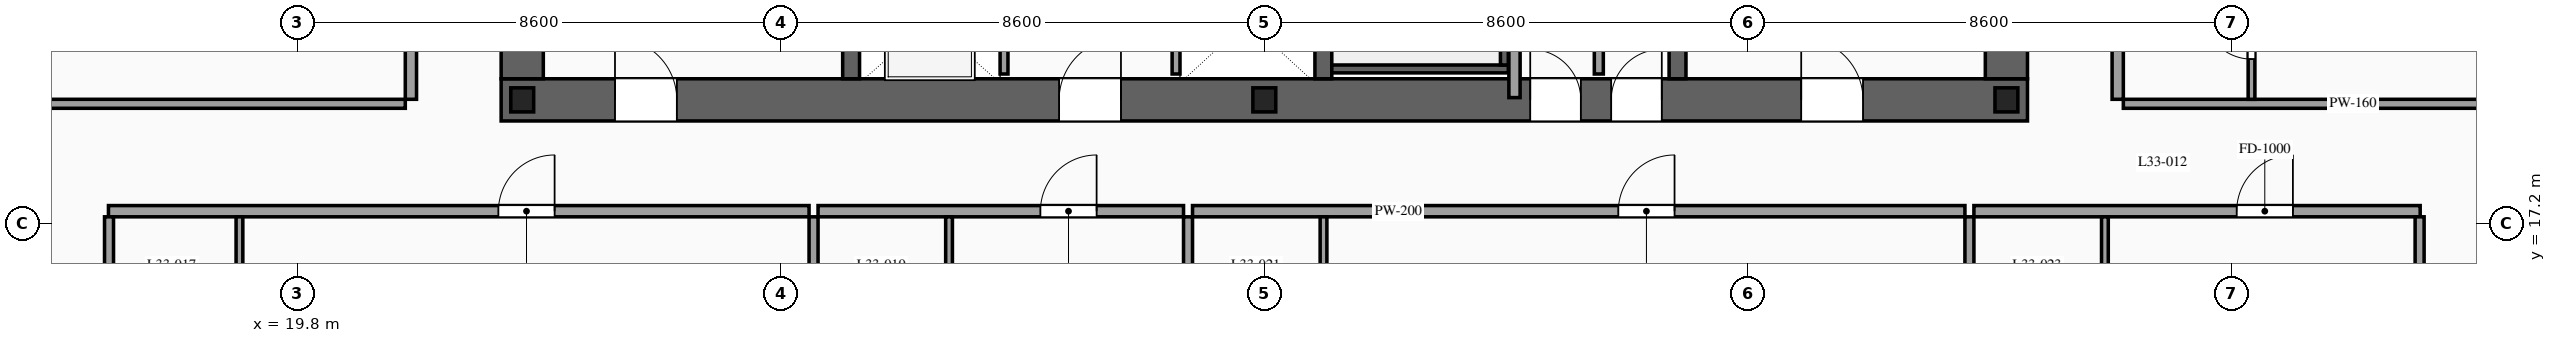
"""IFC4 building model, lengths in metres.
Left out: names, types, materials, properties, quantities, classifications, styles, units other than length and angle.
Written with IfcOpenShell. Run it as: python <this file> out.ifc"""

import sys

from ifc_helpers import new_model, si_unit, direction, frame, frame_2d, origin, origin_2d, place, context, subcontext, project, spatial, rectangle, i_section, extrude, source, transform, mapped, element, fill, save


model = new_model("IFC4")
c1 = context("Model", 3, precision=1e-05, world=origin(), true_north=direction((0.0, 1.0)))
c2 = subcontext(c1, "Body", "Model", "MODEL_VIEW")
j1 = project(units=[si_unit("LENGTHUNIT", "METRE"), si_unit("PLANEANGLEUNIT", "RADIAN")], contexts=[c1])
p1 = place(None, origin())
s1 = spatial("IfcSite", under=j1, at=p1, CompositionType="ELEMENT")
p2 = place(p1, origin())
s2 = spatial("IfcBuilding", under=s1, at=p2, CompositionType="ELEMENT")
p3 = place(p2, frame((0.0, 0.0, 126.2)))
s3 = spatial("IfcBuildingStorey", under=s2, at=p3, CompositionType="ELEMENT", Elevation=126.2)
p4 = place(p3, frame((23.425, 19.4, 0.0), z_axis=(0.0, 0.0, 1.0), x_axis=(1.0, 0.0, 0.0)))
e1 = element("IfcWall", 1, at=p4, inside=s3, PredefinedType="SHEAR", context=c2, shape_type="SweptSolid", body=[
    extrude(rectangle(XDim=27.15, YDim=0.75, at=frame_2d((13.575, 0.0))), origin(), (0.0, 0.0, 1.0), 3.6),
])
p5 = place(p4, frame((2.025, 0.0, 0.0)))
e2 = element("IfcOpeningElement", 2, at=p5, cuts=e1, PredefinedType="OPENING", context=c2, shape_type="SweptSolid", body=[
    extrude(rectangle(XDim=1.1, YDim=2.2, at=frame_2d((0.55, 1.1))), frame((0.0, 0.39, 0.0), z_axis=(0.0, -1.0, 0.0), x_axis=(1.0, 0.0, 0.0)), (0.0, 0.0, 1.0), 0.78),
])
p6 = place(p4, frame((9.925, 0.0, 0.0)))
e3 = element("IfcOpeningElement", 3, at=p6, cuts=e1, PredefinedType="OPENING", context=c2, shape_type="SweptSolid", body=[
    extrude(rectangle(XDim=1.1, YDim=2.2, at=frame_2d((0.55, 1.1))), frame((0.0, 0.39, 0.0), z_axis=(0.0, -1.0, 0.0), x_axis=(1.0, 0.0, 0.0)), (0.0, 0.0, 1.0), 0.78),
])
p7 = place(p4, frame((23.125, 0.0, 0.0)))
e4 = element("IfcOpeningElement", 4, at=p7, cuts=e1, PredefinedType="OPENING", context=c2, shape_type="SweptSolid", body=[
    extrude(rectangle(XDim=1.1, YDim=2.2, at=frame_2d((0.55, 1.1))), frame((0.0, 0.39, 0.0), z_axis=(0.0, -1.0, 0.0), x_axis=(1.0, 0.0, 0.0)), (0.0, 0.0, 1.0), 0.78),
])
p8 = place(p4, frame((19.745, 0.0, 0.0)))
e5 = element("IfcOpeningElement", 5, at=p8, cuts=e1, PredefinedType="OPENING", context=c2, shape_type="SweptSolid", body=[
    extrude(rectangle(XDim=0.9, YDim=2.15, at=frame_2d((0.45, 1.075))), frame((0.0, 0.39, 0.0), z_axis=(0.0, -1.0, 0.0), x_axis=(1.0, 0.0, 0.0)), (0.0, 0.0, 1.0), 0.78),
])
p9 = place(p4, frame((18.305, 0.0, 0.0)))
e6 = element("IfcOpeningElement", 6, at=p9, cuts=e1, PredefinedType="OPENING", context=c2, shape_type="SweptSolid", body=[
    extrude(rectangle(XDim=0.9, YDim=2.15, at=frame_2d((0.45, 1.075))), frame((0.0, 0.39, 0.0), z_axis=(0.0, -1.0, 0.0), x_axis=(1.0, 0.0, 0.0)), (0.0, 0.0, 1.0), 0.78),
])
m1 = source(origin(), c2, "Body", "SweptSolid", [
    extrude(rectangle(XDim=12.05, YDim=0.75, at=frame_2d((6.025, 0.0))), origin(), (0.0, 0.0, 1.0), 3.6),
])
for number, where, z_axis, x_axis in (
    (7, (23.8, 19.775, 0.0), (0.0, 0.0, 1.0), (0.0, 1.0, 0.0)),
    (8, (50.2, 19.775, 0.0), (0.0, 0.0, 1.0), (0.0, 1.0, 0.0)),
):
    element("IfcWall", number, at=place(p3, frame(where, z_axis=z_axis, x_axis=x_axis)), inside=s3, PredefinedType="SHEAR", context=c2, shape_type="MappedRepresentation", body=[
        mapped(m1, transform((0.0, 0.0, 0.0), scale=1.0)),
    ])
m2 = source(origin(), c2, "Body", "SweptSolid", [
    extrude(rectangle(XDim=12.05, YDim=0.3, at=frame_2d((6.025, 0.0))), origin(), (0.0, 0.0, 1.0), 3.6),
])
for number, where, z_axis, x_axis in (
    (9, (29.65, 19.775, 0.0), (0.0, 0.0, 1.0), (0.0, 1.0, 0.0)),
    (10, (38.05, 19.775, 0.0), (0.0, 0.0, 1.0), (0.0, 1.0, 0.0)),
    (11, (44.35, 19.775, 0.0), (0.0, 0.0, 1.0), (0.0, 1.0, 0.0)),
):
    element("IfcWall", number, at=place(p3, frame(where, z_axis=z_axis, x_axis=x_axis)), inside=s3, PredefinedType="SOLIDWALL", context=c2, shape_type="MappedRepresentation", body=[
        mapped(m2, transform((0.0, 0.0, 0.0), scale=1.0)),
    ])
m3 = source(origin(), c2, "Body", "SweptSolid", [
    extrude(i_section(OverallWidth=0.407, OverallDepth=0.428, WebThickness=0.02, FlangeThickness=0.035, at=origin_2d()), origin(), (0.0, 0.0, 1.0), 3.6),
])
for number, where, z_axis, x_axis in (
    (12, (23.8, 19.4, 0.0), (0.0, 0.0, 1.0), (1.0, 0.0, 0.0)),
    (13, (37.0, 19.4, 0.0), (0.0, 0.0, 1.0), (1.0, 0.0, 0.0)),
    (14, (50.2, 19.4, 0.0), (0.0, 0.0, 1.0), (1.0, 0.0, 0.0)),
):
    element("IfcColumn", number, at=place(p3, frame(where, z_axis=z_axis, x_axis=x_axis)), inside=s3, PredefinedType="COLUMN", context=c2, shape_type="MappedRepresentation", body=[
        mapped(m3, transform((0.0, 0.0, 0.0), scale=1.0)),
    ])
p10 = place(p3, frame((32.37, 19.86, 0.0), z_axis=(0.0, 0.0, 1.0), x_axis=(0.0, 1.0, 0.0)))
e15 = element("IfcWall", 15, at=p10, inside=s3, PredefinedType="SOLIDWALL", context=c2, shape_type="SweptSolid", body=[
    extrude(rectangle(XDim=2.04, YDim=0.14, at=frame_2d((1.02, 0.0))), origin(), (0.0, 0.0, 1.0), 3.32),
])
p11 = place(p10, frame((0.47, 0.0, 0.0)))
e16 = element("IfcOpeningElement", 16, at=p11, cuts=e15, PredefinedType="OPENING", context=c2, shape_type="SweptSolid", body=[
    extrude(rectangle(XDim=1.1, YDim=2.2, at=frame_2d((0.55, 1.1))), frame((0.0, 0.085, 0.0), z_axis=(0.0, -1.0, 0.0), x_axis=(1.0, 0.0, 0.0)), (0.0, 0.0, 1.0), 0.17),
])
m4 = source(origin(), c2, "Body", "SweptSolid", [
    extrude(rectangle(XDim=2.04, YDim=0.14, at=frame_2d((1.02, 0.0))), origin(), (0.0, 0.0, 1.0), 3.32),
])
p12 = place(p3, frame((35.43, 19.86, 0.0), z_axis=(0.0, 0.0, 1.0), x_axis=(0.0, 1.0, 0.0)))
e17 = element("IfcWall", 17, at=p12, inside=s3, PredefinedType="SOLIDWALL", context=c2, shape_type="MappedRepresentation", body=[
    mapped(m4, transform((0.0, 0.0, 0.0), scale=1.0)),
])
m5 = source(origin(), c2, "Body", "SweptSolid", [
    extrude(rectangle(XDim=3.14, YDim=0.14, at=frame_2d((1.57, 0.0))), origin(), (0.0, 0.0, 1.0), 3.32),
])
p13 = place(p3, frame((38.2, 19.95, 0.0), z_axis=(0.0, 0.0, 1.0), x_axis=(1.0, 0.0, 0.0)))
e18 = element("IfcWall", 18, at=p13, inside=s3, PredefinedType="SOLIDWALL", context=c2, shape_type="MappedRepresentation", body=[
    mapped(m5, transform((0.0, 0.0, 0.0), scale=1.0)),
])
m6 = source(origin(), c2, "Body", "SweptSolid", [
    extrude(rectangle(XDim=8.94, YDim=0.14, at=frame_2d((4.47, 0.0))), origin(), (0.0, 0.0, 1.0), 3.32),
])
p14 = place(p3, frame((41.27, 20.02, 0.0), z_axis=(0.0, 0.0, 1.0), x_axis=(0.0, 1.0, 0.0)))
e19 = element("IfcWall", 19, at=p14, inside=s3, PredefinedType="SOLIDWALL", context=c2, shape_type="MappedRepresentation", body=[
    mapped(m6, transform((0.0, 0.0, 0.0), scale=1.0)),
])
m7 = source(origin(), c2, "Body", "SweptSolid", [
    extrude(rectangle(XDim=1.34, YDim=0.16, at=frame_2d((0.67, 0.0))), origin(), (0.0, 0.0, 1.0), 3.32),
])
p15 = place(p3, frame((42.95, 19.86, 0.0), z_axis=(0.0, 0.0, 1.0), x_axis=(0.0, 1.0, 0.0)))
e20 = element("IfcWall", 20, at=p15, inside=s3, PredefinedType="PARTITIONING", context=c2, shape_type="MappedRepresentation", body=[
    mapped(m7, transform((0.0, 0.0, 0.0), scale=1.0)),
])
m8 = source(origin(), c2, "Body", "SweptSolid", [
    extrude(rectangle(XDim=12.72, YDim=0.2, at=frame_2d((6.36, 0.0))), origin(), (0.0, 0.0, 1.0), 3.32),
])
p16 = place(p3, frame((41.45, 19.44, 0.0), z_axis=(0.0, 0.0, 1.0), x_axis=(0.0, 1.0, 0.0)))
e21 = element("IfcWall", 21, at=p16, inside=s3, PredefinedType="PARTITIONING", context=c2, shape_type="MappedRepresentation", body=[
    mapped(m8, transform((0.0, 0.0, 0.0), scale=1.0)),
])
p17 = place(p3, frame((16.44, 17.42, 0.0), z_axis=(0.0, 0.0, 1.0), x_axis=(1.0, 0.0, 0.0)))
e22 = element("IfcWall", 22, at=p17, inside=s3, PredefinedType="PARTITIONING", context=c2, shape_type="SweptSolid", body=[
    extrude(rectangle(XDim=12.462, YDim=0.2, at=frame_2d((6.231, 0.0))), origin(), (0.0, 0.0, 1.0), 3.32),
])
p18 = place(p17, frame((6.936, 0.0, 0.0)))
e23 = element("IfcOpeningElement", 23, at=p18, cuts=e22, PredefinedType="OPENING", context=c2, shape_type="SweptSolid", body=[
    extrude(rectangle(XDim=1.0, YDim=2.2, at=frame_2d((0.5, 1.1))), frame((0.0, 0.115, 0.0), z_axis=(0.0, -1.0, 0.0), x_axis=(1.0, 0.0, 0.0)), (0.0, 0.0, 1.0), 0.23),
])
m9 = source(origin(), c2, "Body", "SweptSolid", [
    extrude(rectangle(XDim=14.97, YDim=0.16, at=frame_2d((7.485, 0.0))), origin(), (0.0, 0.0, 1.0), 3.32),
])
p19 = place(p3, frame((28.982, 2.35, 0.0), z_axis=(0.0, 0.0, 1.0), x_axis=(0.0, 1.0, 0.0)))
e24 = element("IfcWall", 24, at=p19, inside=s3, PredefinedType="PARTITIONING", context=c2, shape_type="MappedRepresentation", body=[
    mapped(m9, transform((0.0, 0.0, 0.0), scale=1.0)),
])
m10 = source(origin(), c2, "Body", "SweptSolid", [
    extrude(rectangle(XDim=2.42, YDim=0.12, at=frame_2d((1.21, 0.0))), origin(), (0.0, 0.0, 1.0), 3.32),
])
p20 = place(p3, frame((18.77, 14.9, 0.0), z_axis=(0.0, 0.0, 1.0), x_axis=(0.0, 1.0, 0.0)))
e25 = element("IfcWall", 25, at=p20, inside=s3, PredefinedType="PARTITIONING", context=c2, shape_type="MappedRepresentation", body=[
    mapped(m10, transform((0.0, 0.0, 0.0), scale=1.0)),
])
p21 = place(p3, frame((29.062, 17.42, 0.0), z_axis=(0.0, 0.0, 1.0), x_axis=(1.0, 0.0, 0.0)))
e26 = element("IfcWall", 26, at=p21, inside=s3, PredefinedType="PARTITIONING", context=c2, shape_type="SweptSolid", body=[
    extrude(rectangle(XDim=6.501, YDim=0.2, at=frame_2d((3.25, 0.0))), origin(), (0.0, 0.0, 1.0), 3.32),
])
p22 = place(p21, frame((3.955, 0.0, 0.0)))
e27 = element("IfcOpeningElement", 27, at=p22, cuts=e26, PredefinedType="OPENING", context=c2, shape_type="SweptSolid", body=[
    extrude(rectangle(XDim=1.0, YDim=2.2, at=frame_2d((0.5, 1.1))), frame((0.0, 0.115, 0.0), z_axis=(0.0, -1.0, 0.0), x_axis=(1.0, 0.0, 0.0)), (0.0, 0.0, 1.0), 0.23),
])
p23 = place(p3, frame((35.643, 2.35, 0.0), z_axis=(0.0, 0.0, 1.0), x_axis=(0.0, 1.0, 0.0)))
e28 = element("IfcWall", 28, at=p23, inside=s3, PredefinedType="PARTITIONING", context=c2, shape_type="MappedRepresentation", body=[
    mapped(m9, transform((0.0, 0.0, 0.0), scale=1.0)),
])
p24 = place(p3, frame((31.392, 14.9, 0.0), z_axis=(0.0, 0.0, 1.0), x_axis=(0.0, 1.0, 0.0)))
e29 = element("IfcWall", 29, at=p24, inside=s3, PredefinedType="PARTITIONING", context=c2, shape_type="MappedRepresentation", body=[
    mapped(m10, transform((0.0, 0.0, 0.0), scale=1.0)),
])
p25 = place(p3, frame((35.723, 17.42, 0.0), z_axis=(0.0, 0.0, 1.0), x_axis=(1.0, 0.0, 0.0)))
e30 = element("IfcWall", 30, at=p25, inside=s3, PredefinedType="PARTITIONING", context=c2, shape_type="SweptSolid", body=[
    extrude(rectangle(XDim=13.739, YDim=0.2, at=frame_2d((6.87, 0.0))), origin(), (0.0, 0.0, 1.0), 3.32),
])
p26 = place(p25, frame((7.574, 0.0, 0.0)))
e31 = element("IfcOpeningElement", 31, at=p26, cuts=e30, PredefinedType="OPENING", context=c2, shape_type="SweptSolid", body=[
    extrude(rectangle(XDim=1.0, YDim=2.2, at=frame_2d((0.5, 1.1))), frame((0.0, 0.115, 0.0), z_axis=(0.0, -1.0, 0.0), x_axis=(1.0, 0.0, 0.0)), (0.0, 0.0, 1.0), 0.23),
])
p27 = place(p3, frame((49.542, 2.35, 0.0), z_axis=(0.0, 0.0, 1.0), x_axis=(0.0, 1.0, 0.0)))
e32 = element("IfcWall", 32, at=p27, inside=s3, PredefinedType="PARTITIONING", context=c2, shape_type="MappedRepresentation", body=[
    mapped(m9, transform((0.0, 0.0, 0.0), scale=1.0)),
])
p28 = place(p3, frame((38.053, 14.9, 0.0), z_axis=(0.0, 0.0, 1.0), x_axis=(0.0, 1.0, 0.0)))
e33 = element("IfcWall", 33, at=p28, inside=s3, PredefinedType="PARTITIONING", context=c2, shape_type="MappedRepresentation", body=[
    mapped(m10, transform((0.0, 0.0, 0.0), scale=1.0)),
])
p29 = place(p3, frame((49.622, 17.42, 0.0), z_axis=(0.0, 0.0, 1.0), x_axis=(1.0, 0.0, 0.0)))
e34 = element("IfcWall", 34, at=p29, inside=s3, PredefinedType="PARTITIONING", context=c2, shape_type="SweptSolid", body=[
    extrude(rectangle(XDim=7.938, YDim=0.2, at=frame_2d((3.969, 0.0))), origin(), (0.0, 0.0, 1.0), 3.32),
])
p30 = place(p29, frame((4.674, 0.0, 0.0)))
e35 = element("IfcOpeningElement", 35, at=p30, cuts=e34, PredefinedType="OPENING", context=c2, shape_type="SweptSolid", body=[
    extrude(rectangle(XDim=1.0, YDim=2.2, at=frame_2d((0.5, 1.1))), frame((0.0, 0.115, 0.0), z_axis=(0.0, -1.0, 0.0), x_axis=(1.0, 0.0, 0.0)), (0.0, 0.0, 1.0), 0.23),
])
m11 = source(origin(), c2, "Body", "SweptSolid", [
    extrude(rectangle(XDim=14.82, YDim=0.16, at=frame_2d((7.41, 0.0))), origin(), (0.0, 0.0, 1.0), 3.32),
])
for number, where, z_axis, x_axis in (
    (36, (16.45, 2.5, 0.0), (0.0, 0.0, 1.0), (0.0, 1.0, 0.0)),
    (37, (57.55, 2.5, 0.0), (0.0, 0.0, 1.0), (0.0, 1.0, 0.0)),
):
    element("IfcWall", number, at=place(p3, frame(where, z_axis=z_axis, x_axis=x_axis)), inside=s3, PredefinedType="PARTITIONING", context=c2, shape_type="MappedRepresentation", body=[
        mapped(m11, transform((0.0, 0.0, 0.0), scale=1.0)),
    ])
p31 = place(p3, frame((51.952, 14.9, 0.0), z_axis=(0.0, 0.0, 1.0), x_axis=(0.0, 1.0, 0.0)))
e38 = element("IfcWall", 38, at=p31, inside=s3, PredefinedType="PARTITIONING", context=c2, shape_type="MappedRepresentation", body=[
    mapped(m10, transform((0.0, 0.0, 0.0), scale=1.0)),
])
p32 = place(p3, frame((21.82, 19.41, 0.0), z_axis=(0.0, 0.0, 1.0), x_axis=(0.0, 1.0, 0.0)))
e39 = element("IfcWall", 39, at=p32, inside=s3, PredefinedType="PARTITIONING", context=c2, shape_type="SweptSolid", body=[
    extrude(rectangle(XDim=12.78, YDim=0.2, at=frame_2d((6.39, 0.0))), origin(), (0.0, 0.0, 1.0), 3.32),
])
p33 = place(p32, frame((5.89, 0.0, 0.0)))
e40 = element("IfcOpeningElement", 40, at=p33, cuts=e39, PredefinedType="OPENING", context=c2, shape_type="SweptSolid", body=[
    extrude(rectangle(XDim=1.0, YDim=2.2, at=frame_2d((0.5, 1.1))), frame((0.0, 0.115, 0.0), z_axis=(0.0, -1.0, 0.0), x_axis=(1.0, 0.0, 0.0)), (0.0, 0.0, 1.0), 0.23),
])
m12 = source(origin(), c2, "Body", "SweptSolid", [
    extrude(rectangle(XDim=8.17, YDim=0.16, at=frame_2d((4.085, 0.0))), origin(), (0.0, 0.0, 1.0), 2.815),
])
p34 = place(p3, frame((13.55, 19.33, 0.0), z_axis=(0.0, 0.0, 1.0), x_axis=(1.0, 0.0, 0.0)))
e41 = element("IfcWall", 41, at=p34, inside=s3, PredefinedType="PARTITIONING", context=c2, shape_type="MappedRepresentation", body=[
    mapped(m12, transform((0.0, 0.0, 0.0), scale=1.0)),
])
p35 = place(p3, frame((52.18, 19.41, 0.0), z_axis=(0.0, 0.0, 1.0), x_axis=(0.0, 1.0, 0.0)))
e42 = element("IfcWall", 42, at=p35, inside=s3, PredefinedType="PARTITIONING", context=c2, shape_type="SweptSolid", body=[
    extrude(rectangle(XDim=6.31, YDim=0.2, at=frame_2d((3.155, 0.0))), origin(), (0.0, 0.0, 1.0), 3.32),
])
p36 = place(p35, frame((3.835, 0.0, 0.0)))
e43 = element("IfcOpeningElement", 43, at=p36, cuts=e42, PredefinedType="OPENING", context=c2, shape_type="SweptSolid", body=[
    extrude(rectangle(XDim=1.0, YDim=2.2, at=frame_2d((0.5, 1.1))), frame((0.0, 0.115, 0.0), z_axis=(0.0, -1.0, 0.0), x_axis=(1.0, 0.0, 0.0)), (0.0, 0.0, 1.0), 0.23),
])
p37 = place(p3, frame((52.28, 19.33, 0.0), z_axis=(0.0, 0.0, 1.0), x_axis=(1.0, 0.0, 0.0)))
e44 = element("IfcWall", 44, at=p37, inside=s3, PredefinedType="PARTITIONING", context=c2, shape_type="MappedRepresentation", body=[
    mapped(m12, transform((0.0, 0.0, 0.0), scale=1.0)),
])
p38 = place(p3, frame((54.56, 19.41, 0.0), z_axis=(0.0, 0.0, 1.0), x_axis=(0.0, 1.0, 0.0)))
e45 = element("IfcWall", 45, at=p38, inside=s3, PredefinedType="PARTITIONING", context=c2, shape_type="SweptSolid", body=[
    extrude(rectangle(XDim=2.28, YDim=0.12, at=frame_2d((1.14, 0.0))), origin(), (0.0, 0.0, 1.0), 3.32),
])
p39 = place(p38, frame((0.715, 0.0, 0.0)))
e46 = element("IfcOpeningElement", 46, at=p39, cuts=e45, PredefinedType="OPENING", context=c2, shape_type="SweptSolid", body=[
    extrude(rectangle(XDim=0.85, YDim=2.1, at=frame_2d((0.425, 1.05))), frame((0.0, 0.075, 0.0), z_axis=(0.0, -1.0, 0.0), x_axis=(1.0, 0.0, 0.0)), (0.0, 0.0, 1.0), 0.15),
])
m13 = source(origin(), c2, "Body", "SweptSolid", [
    extrude(rectangle(XDim=1.1, YDim=2.2, at=frame_2d((0.55, 1.1))), frame((0.0, 0.025, 0.0), z_axis=(0.0, -1.0, 0.0), x_axis=(1.0, 0.0, 0.0)), (0.0, 0.0, 1.0), 0.05),
])
p40 = place(p5, origin())
e47 = element("IfcDoor", 47, at=p40, inside=s3, OperationType="SINGLE_SWING_LEFT", PredefinedType="DOOR", context=c2, shape_type="MappedRepresentation", body=[
    mapped(m13, transform((0.0, 0.0, 0.0), scale=1.0)),
])
fill(e2, e47)
p41 = place(p6, origin())
e48 = element("IfcDoor", 48, at=p41, inside=s3, OperationType="SINGLE_SWING_RIGHT", PredefinedType="DOOR", context=c2, shape_type="MappedRepresentation", body=[
    mapped(m13, transform((0.0, 0.0, 0.0), scale=1.0)),
])
fill(e3, e48)
p42 = place(p7, origin())
e49 = element("IfcDoor", 49, at=p42, inside=s3, OperationType="SINGLE_SWING_LEFT", PredefinedType="DOOR", context=c2, shape_type="MappedRepresentation", body=[
    mapped(m13, transform((0.0, 0.0, 0.0), scale=1.0)),
])
fill(e4, e49)
m14 = source(origin(), c2, "Body", "SweptSolid", [
    extrude(rectangle(XDim=0.9, YDim=2.15, at=frame_2d((0.45, 1.075))), frame((0.0, 0.025, 0.0), z_axis=(0.0, -1.0, 0.0), x_axis=(1.0, 0.0, 0.0)), (0.0, 0.0, 1.0), 0.05),
])
p43 = place(p8, origin())
e50 = element("IfcDoor", 50, at=p43, inside=s3, OperationType="SINGLE_SWING_RIGHT", PredefinedType="DOOR", context=c2, shape_type="MappedRepresentation", body=[
    mapped(m14, transform((0.0, 0.0, 0.0), scale=1.0)),
])
fill(e5, e50)
p44 = place(p9, origin())
e51 = element("IfcDoor", 51, at=p44, inside=s3, OperationType="SINGLE_SWING_LEFT", PredefinedType="DOOR", context=c2, shape_type="MappedRepresentation", body=[
    mapped(m14, transform((0.0, 0.0, 0.0), scale=1.0)),
])
fill(e6, e51)
m15 = source(origin(), c2, "Body", "SweptSolid", [
    extrude(rectangle(XDim=1.0, YDim=2.2, at=frame_2d((0.5, 1.1))), frame((0.0, 0.025, 0.0), z_axis=(0.0, -1.0, 0.0), x_axis=(1.0, 0.0, 0.0)), (0.0, 0.0, 1.0), 0.05),
])
p45 = place(p18, origin())
e52 = element("IfcDoor", 52, at=p45, inside=s3, OperationType="SINGLE_SWING_RIGHT", PredefinedType="DOOR", context=c2, shape_type="MappedRepresentation", body=[
    mapped(m15, transform((0.0, 0.0, 0.0), scale=1.0)),
])
fill(e23, e52)
p46 = place(p22, origin())
e53 = element("IfcDoor", 53, at=p46, inside=s3, OperationType="SINGLE_SWING_RIGHT", PredefinedType="DOOR", context=c2, shape_type="MappedRepresentation", body=[
    mapped(m15, transform((0.0, 0.0, 0.0), scale=1.0)),
])
fill(e27, e53)
p47 = place(p26, origin())
e54 = element("IfcDoor", 54, at=p47, inside=s3, OperationType="SINGLE_SWING_RIGHT", PredefinedType="DOOR", context=c2, shape_type="MappedRepresentation", body=[
    mapped(m15, transform((0.0, 0.0, 0.0), scale=1.0)),
])
fill(e31, e54)
p48 = place(p30, origin())
e55 = element("IfcDoor", 55, at=p48, inside=s3, OperationType="SINGLE_SWING_RIGHT", PredefinedType="DOOR", context=c2, shape_type="MappedRepresentation", body=[
    mapped(m15, transform((0.0, 0.0, 0.0), scale=1.0)),
])
fill(e35, e55)
m16 = source(origin(), c2, "Body", "SweptSolid", [
    extrude(rectangle(XDim=0.85, YDim=2.1, at=frame_2d((0.425, 1.05))), frame((0.0, 0.025, 0.0), z_axis=(0.0, -1.0, 0.0), x_axis=(1.0, 0.0, 0.0)), (0.0, 0.0, 1.0), 0.05),
])
p49 = place(p39, origin())
e56 = element("IfcDoor", 56, at=p49, inside=s3, OperationType="SINGLE_SWING_RIGHT", PredefinedType="DOOR", context=c2, shape_type="MappedRepresentation", body=[
    mapped(m16, transform((0.0, 0.0, 0.0), scale=1.0)),
])
fill(e46, e56)
save(model, sys.argv[1])
